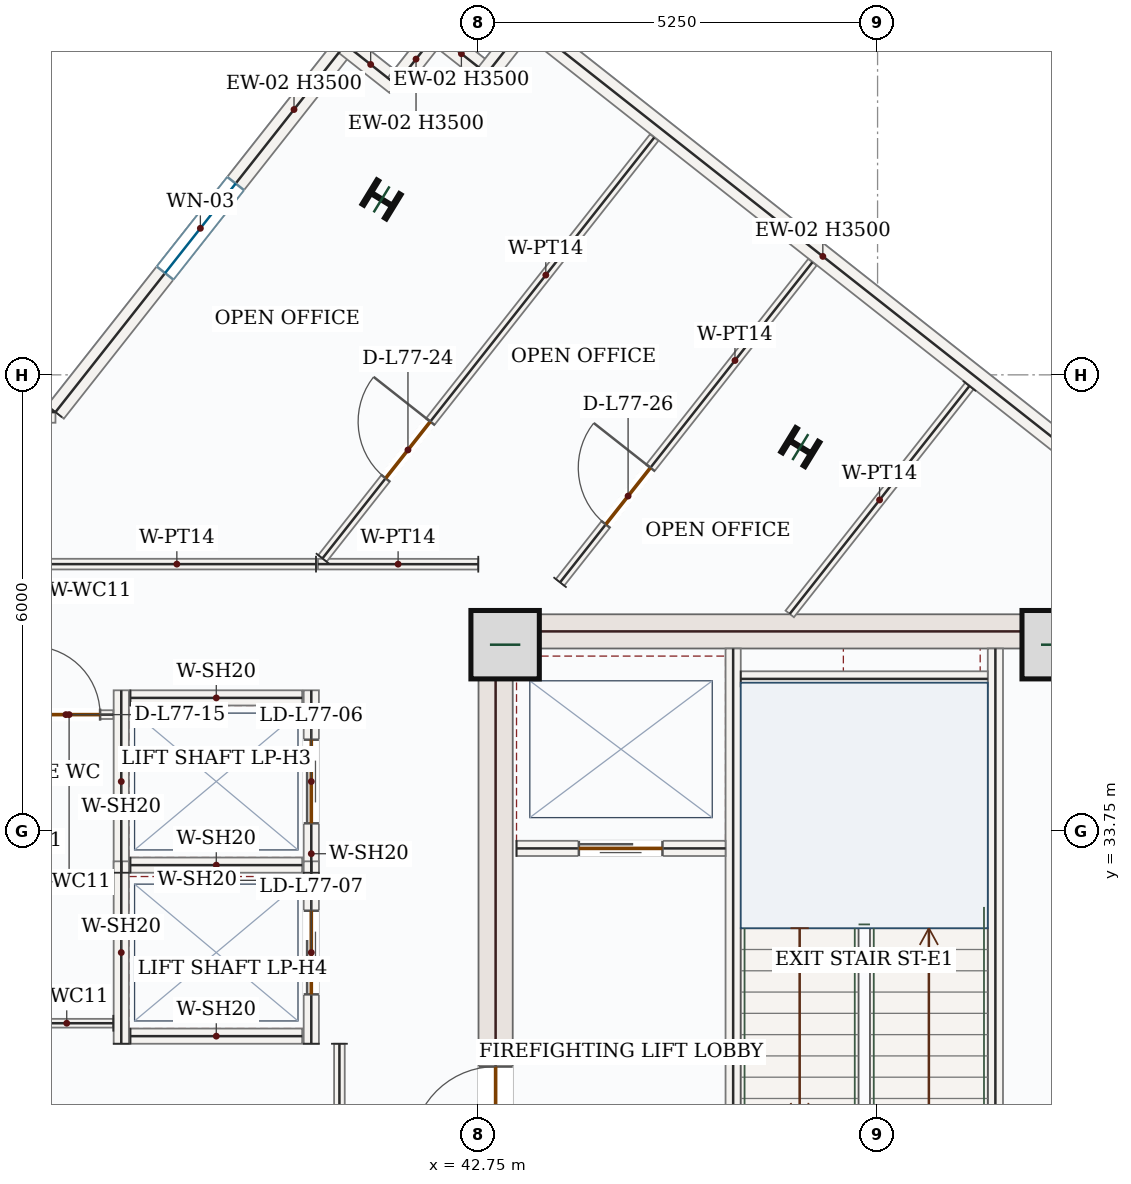
"""IFC4 building model, lengths in metres.
Left out: names, types, materials, properties, quantities, classifications, styles, units other than length and angle.
Written with IfcOpenShell. Run it as: python <this file> out.ifc"""

import sys

from ifc_helpers import new_model, si_unit, direction, frame, frame_2d, origin, origin_2d, place, context, subcontext, project, spatial, rectangle, i_section, extrude, source, transform, mapped, element, fill, save


model = new_model("IFC4")
c1 = context("Model", 3, precision=1e-05, world=origin(), true_north=direction((0.0, 1.0)))
c2 = subcontext(c1, "Body", "Model", "MODEL_VIEW")
j1 = project(units=[si_unit("LENGTHUNIT", "METRE"), si_unit("PLANEANGLEUNIT", "RADIAN")], contexts=[c1])
p1 = place(None, origin())
s1 = spatial("IfcSite", under=j1, at=p1, CompositionType="ELEMENT")
p2 = place(p1, origin())
s2 = spatial("IfcBuilding", under=s1, at=p2, CompositionType="ELEMENT")
p3 = place(p2, frame((0.0, 0.0, 319.8)))
s3 = spatial("IfcBuildingStorey", under=s2, at=p3, CompositionType="ELEMENT", Elevation=319.8)
p4 = place(p3, frame((42.975, 28.05, 0.0), z_axis=(0.0, 0.0, 1.0), x_axis=(0.0, 1.0, 0.0)))
e1 = element("IfcWall", 1, at=p4, inside=s3, PredefinedType="SHEAR", context=c2, shape_type="SweptSolid", body=[
    extrude(rectangle(XDim=8.55, YDim=0.45, at=frame_2d((4.275, 0.0))), origin(), (0.0, 0.0, 1.0), 3.5),
])
p5 = place(p4, frame((1.5, 0.0, 0.0)))
e2 = element("IfcOpeningElement", 2, at=p5, cuts=e1, PredefinedType="OPENING", context=c2, shape_type="SweptSolid", body=[
    extrude(rectangle(XDim=1.1, YDim=2.2, at=frame_2d((0.55, 1.1))), frame((0.0, 0.235, 0.0), z_axis=(0.0, -1.0, 0.0), x_axis=(1.0, 0.0, 0.0)), (0.0, 0.0, 1.0), 0.47),
])
m1 = source(origin(), c2, "Body", "SweptSolid", [
    extrude(rectangle(XDim=7.1, YDim=0.45, at=frame_2d((3.55, 0.0))), origin(), (0.0, 0.0, 1.0), 3.5),
])
p6 = place(p3, frame((43.2, 36.375, 0.0), z_axis=(0.0, 0.0, 1.0), x_axis=(1.0, 0.0, 0.0)))
e3 = element("IfcWall", 3, at=p6, inside=s3, PredefinedType="SHEAR", context=c2, shape_type="MappedRepresentation", body=[
    mapped(m1, transform((0.0, 0.0, 0.0), x_axis=(1.0, 0.0, 0.0), y_axis=(0.0, 1.0, 0.0), z_axis=(0.0, 0.0, 1.0), scale=1.0)),
])
m2 = source(origin(), c2, "Body", "SweptSolid", [
    extrude(rectangle(XDim=0.9, YDim=0.9, at=origin_2d()), origin(), (0.0, 0.0, 1.0), 3.75),
])
for number, where, z_axis, x_axis in (
    (4, (43.1, 36.2, 0.0), (0.0, 0.0, 1.0), (1.0, 0.0, 0.0)),
    (5, (50.35, 36.2, 0.0), (0.0, 0.0, 1.0), (1.0, 0.0, 0.0)),
):
    element("IfcColumn", number, at=place(p3, frame(where, z_axis=z_axis, x_axis=x_axis)), inside=s3, PredefinedType="COLUMN", context=c2, shape_type="MappedRepresentation", body=[
        mapped(m2, transform((0.0, 0.0, 0.0), x_axis=(1.0, 0.0, 0.0), y_axis=(0.0, 1.0, 0.0), z_axis=(0.0, 0.0, 1.0), scale=1.0)),
    ])
m3 = source(origin(), c2, "Body", "SweptSolid", [
    extrude(i_section(OverallWidth=0.374, OverallDepth=0.372, WebThickness=0.016, FlangeThickness=0.026, FilletRadius=0.018, at=origin_2d()), origin(), (0.0, 0.0, 1.0), 3.75),
])
for number, where, z_axis, x_axis in (
    (6, (46.984, 38.8, 0.0), (0.0, 0.0, 1.0), (0.522, 0.853, 0.0)),
    (7, (41.475, 42.058, 0.0), (0.0, 0.0, 1.0), (0.522, 0.853, 0.0)),
):
    element("IfcColumn", number, at=place(p3, frame(where, z_axis=z_axis, x_axis=x_axis)), inside=s3, PredefinedType="COLUMN", context=c2, shape_type="MappedRepresentation", body=[
        mapped(m3, transform((0.0, 0.0, 0.0), x_axis=(1.0, 0.0, 0.0), y_axis=(0.0, 1.0, 0.0), z_axis=(0.0, 0.0, 1.0), scale=1.0)),
    ])
m4 = source(origin(), c2, "Body", "SweptSolid", [
    extrude(rectangle(XDim=5.978, YDim=0.28, at=frame_2d((2.989, 0.0))), origin(), (0.0, 0.0, 1.0), 3.5),
])
p7 = place(p3, frame((31.206, 39.26, 0.0), z_axis=(0.0, 0.0, 1.0), x_axis=(1.0, 0.0, 0.0)))
e8 = element("IfcWall", 8, at=p7, inside=s3, PredefinedType="SOLIDWALL", context=c2, shape_type="MappedRepresentation", body=[
    mapped(m4, transform((0.0, 0.0, 0.0), x_axis=(1.0, 0.0, 0.0), y_axis=(0.0, 1.0, 0.0), z_axis=(0.0, 0.0, 1.0), scale=1.0)),
])
p8 = place(p3, frame((37.184, 39.26, 0.0), z_axis=(0.0, 0.0, 1.0), x_axis=(0.619100474058, 0.78531178714, 0.0)))
e9 = element("IfcWall", 9, at=p8, inside=s3, PredefinedType="SOLIDWALL", context=c2, shape_type="SweptSolid", body=[
    extrude(rectangle(XDim=6.159, YDim=0.28, at=frame_2d((3.08, 0.0))), origin(), (0.0, 0.0, 1.0), 3.5),
])
p9 = place(p8, frame((2.329, 0.0, 0.85)))
e10 = element("IfcOpeningElement", 10, at=p9, cuts=e9, PredefinedType="OPENING", context=c2, shape_type="SweptSolid", body=[
    extrude(rectangle(XDim=1.5, YDim=1.5, at=frame_2d((0.75, 0.75))), frame((0.0, 0.15, 0.0), z_axis=(0.0, -1.0, 0.0), x_axis=(1.0, 0.0, 0.0)), (0.0, 0.0, 1.0), 0.3),
])
m5 = source(origin(), c2, "Body", "SweptSolid", [
    extrude(rectangle(XDim=0.85, YDim=0.28, at=frame_2d((0.425, 0.0))), origin(), (0.0, 0.0, 1.0), 3.5),
])
p10 = place(p3, frame((40.997, 44.097, 0.0), z_axis=(0.0, 0.0, 1.0), x_axis=(0.785220826193, -0.619215838066, 0.0)))
e11 = element("IfcWall", 11, at=p10, inside=s3, PredefinedType="SOLIDWALL", context=c2, shape_type="MappedRepresentation", body=[
    mapped(m5, transform((0.0, 0.0, 0.0), x_axis=(1.0, 0.0, 0.0), y_axis=(0.0, 1.0, 0.0), z_axis=(0.0, 0.0, 1.0), scale=1.0)),
])
m6 = source(origin(), c2, "Body", "SweptSolid", [
    extrude(rectangle(XDim=0.85, YDim=0.28, at=frame_2d((0.425, 0.0))), origin(), (0.0, 0.0, 1.0), 3.5),
])
for number, where, z_axis, x_axis in (
    (12, (41.665, 43.57, 0.0), (0.0, 0.0, 1.0), (0.619, 0.785, 0.0)),
    (13, (42.191, 44.238, 0.0), (0.0, 0.0, 1.0), (0.785, -0.619, 0.0)),
):
    element("IfcWall", number, at=place(p3, frame(where, z_axis=z_axis, x_axis=x_axis)), inside=s3, PredefinedType="SOLIDWALL", context=c2, shape_type="MappedRepresentation", body=[
        mapped(m6, transform((0.0, 0.0, 0.0), x_axis=(1.0, 0.0, 0.0), y_axis=(0.0, 1.0, 0.0), z_axis=(0.0, 0.0, 1.0), scale=1.0)),
    ])
p11 = place(p3, frame((42.858, 43.712, 0.0), z_axis=(0.0, 0.0, 1.0), x_axis=(0.619215838066, 0.785220826193, 0.0)))
e14 = element("IfcWall", 14, at=p11, inside=s3, PredefinedType="SOLIDWALL", context=c2, shape_type="MappedRepresentation", body=[
    mapped(m5, transform((0.0, 0.0, 0.0), x_axis=(1.0, 0.0, 0.0), y_axis=(0.0, 1.0, 0.0), z_axis=(0.0, 0.0, 1.0), scale=1.0)),
])
m7 = source(origin(), c2, "Body", "SweptSolid", [
    extrude(rectangle(XDim=9.92, YDim=0.28, at=frame_2d((4.96, 0.0))), origin(), (0.0, 0.0, 1.0), 3.5),
])
p12 = place(p3, frame((43.385, 44.379, 0.0), z_axis=(0.0, 0.0, 1.0), x_axis=(0.785317257435, -0.619093535077, 0.0)))
e15 = element("IfcWall", 15, at=p12, inside=s3, PredefinedType="SOLIDWALL", context=c2, shape_type="MappedRepresentation", body=[
    mapped(m7, transform((0.0, 0.0, 0.0), x_axis=(1.0, 0.0, 0.0), y_axis=(0.0, 1.0, 0.0), z_axis=(0.0, 0.0, 1.0), scale=1.0)),
])
m8 = source(origin(), c2, "Body", "SweptSolid", [
    extrude(rectangle(XDim=7.87, YDim=0.2, at=frame_2d((3.935, 0.0))), origin(), (0.0, 0.0, 1.0), 3.5),
])
p13 = place(p3, frame((49.55, 28.28, 0.0), z_axis=(0.0, 0.0, 1.0), x_axis=(0.0, 1.0, 0.0)))
e16 = element("IfcWall", 16, at=p13, inside=s3, PredefinedType="SOLIDWALL", context=c2, shape_type="MappedRepresentation", body=[
    mapped(m8, transform((0.0, 0.0, 0.0), x_axis=(1.0, 0.0, 0.0), y_axis=(0.0, 1.0, 0.0), z_axis=(0.0, 0.0, 1.0), scale=1.0)),
])
p14 = place(p3, frame((46.1, 28.15, 0.0), z_axis=(0.0, 0.0, 1.0), x_axis=(0.0, 1.0, 0.0)))
e17 = element("IfcWall", 17, at=p14, inside=s3, PredefinedType="SOLIDWALL", context=c2, shape_type="SweptSolid", body=[
    extrude(rectangle(XDim=8.0, YDim=0.2, at=frame_2d((4.0, 0.0))), origin(), (0.0, 0.0, 1.0), 3.5),
])
p15 = place(p14, frame((0.4, 0.0, 0.0)))
e18 = element("IfcOpeningElement", 18, at=p15, cuts=e17, PredefinedType="OPENING", context=c2, shape_type="SweptSolid", body=[
    extrude(rectangle(XDim=1.05, YDim=2.15, at=frame_2d((0.525, 1.075))), frame((0.0, 0.11, 0.0), z_axis=(0.0, -1.0, 0.0), x_axis=(1.0, 0.0, 0.0)), (0.0, 0.0, 1.0), 0.22),
])
m9 = source(origin(), c2, "Body", "SweptSolid", [
    extrude(rectangle(XDim=3.25, YDim=0.2, at=frame_2d((1.625, 0.0))), origin(), (0.0, 0.0, 1.0), 3.5),
])
p16 = place(p3, frame((46.2, 35.75, 0.0), z_axis=(0.0, 0.0, 1.0), x_axis=(1.0, 0.0, 0.0)))
e19 = element("IfcWall", 19, at=p16, inside=s3, PredefinedType="SOLIDWALL", context=c2, shape_type="MappedRepresentation", body=[
    mapped(m9, transform((0.0, 0.0, 0.0), x_axis=(1.0, 0.0, 0.0), y_axis=(0.0, 1.0, 0.0), z_axis=(0.0, 0.0, 1.0), scale=1.0)),
])
p17 = place(p3, frame((43.25, 33.52, 0.0), z_axis=(0.0, 0.0, 1.0), x_axis=(1.0, 0.0, 0.0)))
e20 = element("IfcWall", 20, at=p17, inside=s3, PredefinedType="SOLIDWALL", context=c2, shape_type="SweptSolid", body=[
    extrude(rectangle(XDim=2.75, YDim=0.2, at=frame_2d((1.375, 0.0))), origin(), (0.0, 0.0, 1.0), 3.5),
])
p18 = place(p17, frame((0.82, 0.0, 0.0)))
e21 = element("IfcOpeningElement", 21, at=p18, cuts=e20, PredefinedType="OPENING", context=c2, shape_type="SweptSolid", body=[
    extrude(rectangle(XDim=1.1, YDim=2.15, at=frame_2d((0.55, 1.075))), frame((0.0, 0.11, 0.0), z_axis=(0.0, -1.0, 0.0), x_axis=(1.0, 0.0, 0.0)), (0.0, 0.0, 1.0), 0.22),
])
m10 = source(origin(), c2, "Body", "SweptSolid", [
    extrude(rectangle(XDim=2.4, YDim=0.2, at=frame_2d((1.2, 0.0))), origin(), (0.0, 0.0, 1.0), 3.5),
])
p19 = place(p3, frame((38.05, 33.2, 0.0), z_axis=(0.0, 0.0, 1.0), x_axis=(0.0, 1.0, 0.0)))
e22 = element("IfcWall", 22, at=p19, inside=s3, PredefinedType="SOLIDWALL", context=c2, shape_type="MappedRepresentation", body=[
    mapped(m10, transform((0.0, 0.0, 0.0), x_axis=(1.0, 0.0, 0.0), y_axis=(0.0, 1.0, 0.0), z_axis=(0.0, 0.0, 1.0), scale=1.0)),
])
p20 = place(p3, frame((40.55, 33.2, 0.0), z_axis=(0.0, 0.0, 1.0), x_axis=(0.0, 1.0, 0.0)))
e23 = element("IfcWall", 23, at=p20, inside=s3, PredefinedType="SOLIDWALL", context=c2, shape_type="SweptSolid", body=[
    extrude(rectangle(XDim=2.4, YDim=0.2, at=frame_2d((1.2, 0.0))), origin(), (0.0, 0.0, 1.0), 3.5),
])
p21 = place(p20, frame((0.65, 0.0, 0.0)))
e24 = element("IfcOpeningElement", 24, at=p21, cuts=e23, PredefinedType="OPENING", context=c2, shape_type="SweptSolid", body=[
    extrude(rectangle(XDim=1.1, YDim=2.15, at=frame_2d((0.55, 1.075))), frame((0.0, 0.11, 0.0), z_axis=(0.0, -1.0, 0.0), x_axis=(1.0, 0.0, 0.0)), (0.0, 0.0, 1.0), 0.22),
])
m11 = source(origin(), c2, "Body", "SweptSolid", [
    extrude(rectangle(XDim=2.26, YDim=0.2, at=frame_2d((1.13, 0.0))), origin(), (0.0, 0.0, 1.0), 3.5),
])
for number, where, z_axis, x_axis in (
    (25, (38.17, 33.3, 0.0), (0.0, 0.0, 1.0), (1.0, 0.0, 0.0)),
    (26, (38.17, 35.5, 0.0), (0.0, 0.0, 1.0), (1.0, 0.0, 0.0)),
):
    element("IfcWall", number, at=place(p3, frame(where, z_axis=z_axis, x_axis=x_axis)), inside=s3, PredefinedType="SOLIDWALL", context=c2, shape_type="MappedRepresentation", body=[
        mapped(m11, transform((0.0, 0.0, 0.0), x_axis=(1.0, 0.0, 0.0), y_axis=(0.0, 1.0, 0.0), z_axis=(0.0, 0.0, 1.0), scale=1.0)),
    ])
p22 = place(p3, frame((38.05, 30.95, 0.0), z_axis=(0.0, 0.0, 1.0), x_axis=(0.0, 1.0, 0.0)))
e27 = element("IfcWall", 27, at=p22, inside=s3, PredefinedType="SOLIDWALL", context=c2, shape_type="MappedRepresentation", body=[
    mapped(m10, transform((0.0, 0.0, 0.0), x_axis=(1.0, 0.0, 0.0), y_axis=(0.0, 1.0, 0.0), z_axis=(0.0, 0.0, 1.0), scale=1.0)),
])
p23 = place(p3, frame((40.55, 30.95, 0.0), z_axis=(0.0, 0.0, 1.0), x_axis=(0.0, 1.0, 0.0)))
e28 = element("IfcWall", 28, at=p23, inside=s3, PredefinedType="SOLIDWALL", context=c2, shape_type="SweptSolid", body=[
    extrude(rectangle(XDim=2.4, YDim=0.2, at=frame_2d((1.2, 0.0))), origin(), (0.0, 0.0, 1.0), 3.5),
])
p24 = place(p23, frame((0.65, 0.0, 0.0)))
e29 = element("IfcOpeningElement", 29, at=p24, cuts=e28, PredefinedType="OPENING", context=c2, shape_type="SweptSolid", body=[
    extrude(rectangle(XDim=1.1, YDim=2.15, at=frame_2d((0.55, 1.075))), frame((0.0, 0.11, 0.0), z_axis=(0.0, -1.0, 0.0), x_axis=(1.0, 0.0, 0.0)), (0.0, 0.0, 1.0), 0.22),
])
p25 = place(p3, frame((38.17, 31.05, 0.0), z_axis=(0.0, 0.0, 1.0), x_axis=(1.0, 0.0, 0.0)))
e30 = element("IfcWall", 30, at=p25, inside=s3, PredefinedType="SOLIDWALL", context=c2, shape_type="MappedRepresentation", body=[
    mapped(m11, transform((0.0, 0.0, 0.0), x_axis=(1.0, 0.0, 0.0), y_axis=(0.0, 1.0, 0.0), z_axis=(0.0, 0.0, 1.0), scale=1.0)),
])
m12 = source(origin(), c2, "Body", "SweptSolid", [
    extrude(rectangle(XDim=1.225, YDim=0.115, at=frame_2d((0.613, 0.0))), origin(), (0.0, 0.0, 1.0), 3.5),
])
p26 = place(p3, frame((37.945, 31.22, 0.0), z_axis=(0.0, 0.0, 1.0), x_axis=(-1.0, 0.0, 0.0)))
e31 = element("IfcWall", 31, at=p26, inside=s3, PredefinedType="PARTITIONING", context=c2, shape_type="MappedRepresentation", body=[
    mapped(m12, transform((0.0, 0.0, 0.0), x_axis=(1.0, 0.0, 0.0), y_axis=(0.0, 1.0, 0.0), z_axis=(0.0, 0.0, 1.0), scale=1.0)),
])
p27 = place(p3, frame((36.782, 35.28, 0.0), z_axis=(0.0, 0.0, 1.0), x_axis=(1.0, 0.0, 0.0)))
e32 = element("IfcWall", 32, at=p27, inside=s3, PredefinedType="PARTITIONING", context=c2, shape_type="SweptSolid", body=[
    extrude(rectangle(XDim=1.163, YDim=0.115, at=frame_2d((0.581, 0.0))), origin(), (0.0, 0.0, 1.0), 3.5),
])
p28 = place(p27, frame((0.089, 0.0, 0.0)))
e33 = element("IfcOpeningElement", 33, at=p28, cuts=e32, PredefinedType="OPENING", context=c2, shape_type="SweptSolid", body=[
    extrude(rectangle(XDim=0.9, YDim=2.1, at=frame_2d((0.45, 1.05))), frame((0.0, 0.067, 0.0), z_axis=(0.0, -1.0, 0.0), x_axis=(1.0, 0.0, 0.0)), (0.0, 0.0, 1.0), 0.135),
])
m13 = source(origin(), c2, "Body", "SweptSolid", [
    extrude(rectangle(XDim=3.818, YDim=0.14, at=frame_2d((1.909, 0.0))), origin(), (0.0, 0.0, 1.0), 3.5),
])
p29 = place(p3, frame((49.208, 39.604, 0.0), z_axis=(0.0, 0.0, 1.0), x_axis=(-0.619119655452, -0.78529666511, 0.0)))
e34 = element("IfcWall", 34, at=p29, inside=s3, PredefinedType="PARTITIONING", context=c2, shape_type="MappedRepresentation", body=[
    mapped(m13, transform((0.0, 0.0, 0.0), x_axis=(1.0, 0.0, 0.0), y_axis=(0.0, 1.0, 0.0), z_axis=(0.0, 0.0, 1.0), scale=1.0)),
])
p30 = place(p3, frame((43.823, 37.02, 0.0), z_axis=(0.0, 0.0, 1.0), x_axis=(0.619105408422, 0.785307897109, 0.0)))
e35 = element("IfcWall", 35, at=p30, inside=s3, PredefinedType="PARTITIONING", context=c2, shape_type="SweptSolid", body=[
    extrude(rectangle(XDim=5.363, YDim=0.14, at=frame_2d((2.682, 0.0))), origin(), (0.0, 0.0, 1.0), 3.5),
])
p31 = place(p30, frame((0.971, 0.0, 0.0)))
e36 = element("IfcOpeningElement", 36, at=p31, cuts=e35, PredefinedType="OPENING", context=c2, shape_type="SweptSolid", body=[
    extrude(rectangle(XDim=0.95, YDim=2.15, at=frame_2d((0.475, 1.075))), frame((0.0, 0.08, 0.0), z_axis=(0.0, -1.0, 0.0), x_axis=(1.0, 0.0, 0.0)), (0.0, 0.0, 1.0), 0.16),
])
m14 = source(origin(), c2, "Body", "SweptSolid", [
    extrude(rectangle(XDim=2.109, YDim=0.14, at=frame_2d((1.054, 0.0))), origin(), (0.0, 0.0, 1.0), 3.5),
])
p32 = place(p3, frame((42.747, 37.259, 0.0), z_axis=(0.0, 0.0, 1.0), x_axis=(-0.999999832474, 0.000578837597, 0.0)))
e37 = element("IfcWall", 37, at=p32, inside=s3, PredefinedType="PARTITIONING", context=c2, shape_type="MappedRepresentation", body=[
    mapped(m14, transform((0.0, 0.0, 0.0), x_axis=(1.0, 0.0, 0.0), y_axis=(0.0, 1.0, 0.0), z_axis=(0.0, 0.0, 1.0), scale=1.0)),
])
p33 = place(p3, frame((40.697, 37.335, 0.0), z_axis=(0.0, 0.0, 1.0), x_axis=(0.619105259882, 0.785308014213, 0.0)))
e38 = element("IfcWall", 38, at=p33, inside=s3, PredefinedType="PARTITIONING", context=c2, shape_type="SweptSolid", body=[
    extrude(rectangle(XDim=7.051, YDim=0.14, at=frame_2d((3.525, 0.0))), origin(), (0.0, 0.0, 1.0), 3.5),
])
p34 = place(p33, frame((1.342, 0.0, 0.0)))
e39 = element("IfcOpeningElement", 39, at=p34, cuts=e38, PredefinedType="OPENING", context=c2, shape_type="SweptSolid", body=[
    extrude(rectangle(XDim=0.95, YDim=2.15, at=frame_2d((0.475, 1.075))), frame((0.0, 0.08, 0.0), z_axis=(0.0, -1.0, 0.0), x_axis=(1.0, 0.0, 0.0)), (0.0, 0.0, 1.0), 0.16),
])
m15 = source(origin(), c2, "Body", "SweptSolid", [
    extrude(rectangle(XDim=3.01, YDim=0.14, at=frame_2d((1.505, 0.0))), origin(), (0.0, 0.0, 1.0), 3.5),
])
p35 = place(p3, frame((40.92, 30.95, 0.0), z_axis=(0.0, 0.0, 1.0), x_axis=(0.0, -1.0, 0.0)))
e40 = element("IfcWall", 40, at=p35, inside=s3, PredefinedType="PARTITIONING", context=c2, shape_type="MappedRepresentation", body=[
    mapped(m15, transform((0.0, 0.0, 0.0), x_axis=(1.0, 0.0, 0.0), y_axis=(0.0, 1.0, 0.0), z_axis=(0.0, 0.0, 1.0), scale=1.0)),
])
p36 = place(p3, frame((40.612, 37.26, 0.0), z_axis=(0.0, 0.0, 1.0), x_axis=(-1.0, 0.0, 0.0)))
e41 = element("IfcWall", 41, at=p36, inside=s3, PredefinedType="PARTITIONING", context=c2, shape_type="SweptSolid", body=[
    extrude(rectangle(XDim=5.837, YDim=0.14, at=frame_2d((2.918, 0.0))), origin(), (0.0, 0.0, 1.0), 3.5),
])
p37 = place(p36, frame((3.812, 0.0, 0.0)))
e42 = element("IfcOpeningElement", 42, at=p37, cuts=e41, PredefinedType="OPENING", context=c2, shape_type="SweptSolid", body=[
    extrude(rectangle(XDim=0.95, YDim=2.15, at=frame_2d((0.475, 1.075))), frame((0.0, 0.08, 0.0), z_axis=(0.0, -1.0, 0.0), x_axis=(1.0, 0.0, 0.0)), (0.0, 0.0, 1.0), 0.16),
])
m16 = source(origin(), c2, "Body", "SweptSolid", [
    extrude(rectangle(XDim=1.5, YDim=1.5, at=frame_2d((0.75, 0.75))), frame((0.0, 0.03, 0.0), z_axis=(0.0, -1.0, 0.0), x_axis=(1.0, 0.0, 0.0)), (0.0, 0.0, 1.0), 0.06),
])
p38 = place(p9, origin())
e43 = element("IfcWindow", 43, at=p38, inside=s3, PartitioningType="SINGLE_PANEL", PredefinedType="WINDOW", context=c2, shape_type="MappedRepresentation", body=[
    mapped(m16, transform((0.0, 0.0, 0.0), x_axis=(1.0, 0.0, 0.0), y_axis=(0.0, 1.0, 0.0), z_axis=(0.0, 0.0, 1.0), scale=1.0)),
])
fill(e10, e43)
m17 = source(origin(), c2, "Body", "SweptSolid", [
    extrude(rectangle(XDim=1.1, YDim=2.15, at=frame_2d((0.55, 1.075))), frame((0.0, 0.025, 0.0), z_axis=(0.0, -1.0, 0.0), x_axis=(1.0, 0.0, 0.0)), (0.0, 0.0, 1.0), 0.05),
])
p39 = place(p18, origin())
e44 = element("IfcDoor", 44, at=p39, inside=s3, OperationType="DOUBLE_DOOR_SLIDING", PredefinedType="DOOR", context=c2, shape_type="MappedRepresentation", body=[
    mapped(m17, transform((0.0, 0.0, 0.0), x_axis=(1.0, 0.0, 0.0), y_axis=(0.0, 1.0, 0.0), z_axis=(0.0, 0.0, 1.0), scale=1.0)),
])
fill(e21, e44)
m18 = source(origin(), c2, "Body", "SweptSolid", [
    extrude(rectangle(XDim=1.1, YDim=2.2, at=frame_2d((0.55, 1.1))), frame((0.0, 0.025, 0.0), z_axis=(0.0, -1.0, 0.0), x_axis=(1.0, 0.0, 0.0)), (0.0, 0.0, 1.0), 0.05),
])
p40 = place(p5, origin())
e45 = element("IfcDoor", 45, at=p40, inside=s3, OperationType="SINGLE_SWING_LEFT", PredefinedType="DOOR", context=c2, shape_type="MappedRepresentation", body=[
    mapped(m18, transform((0.0, 0.0, 0.0), x_axis=(1.0, 0.0, 0.0), y_axis=(0.0, 1.0, 0.0), z_axis=(0.0, 0.0, 1.0), scale=1.0)),
])
fill(e2, e45)
p41 = place(p21, origin())
e46 = element("IfcDoor", 46, at=p41, inside=s3, OperationType="DOUBLE_DOOR_SLIDING", PredefinedType="DOOR", context=c2, shape_type="MappedRepresentation", body=[
    mapped(m17, transform((0.0, 0.0, 0.0), x_axis=(1.0, 0.0, 0.0), y_axis=(0.0, 1.0, 0.0), z_axis=(0.0, 0.0, 1.0), scale=1.0)),
])
fill(e24, e46)
p42 = place(p24, origin())
e47 = element("IfcDoor", 47, at=p42, inside=s3, OperationType="DOUBLE_DOOR_SLIDING", PredefinedType="DOOR", context=c2, shape_type="MappedRepresentation", body=[
    mapped(m17, transform((0.0, 0.0, 0.0), x_axis=(1.0, 0.0, 0.0), y_axis=(0.0, 1.0, 0.0), z_axis=(0.0, 0.0, 1.0), scale=1.0)),
])
fill(e29, e47)
m19 = source(origin(), c2, "Body", "SweptSolid", [
    extrude(rectangle(XDim=0.9, YDim=2.1, at=frame_2d((0.45, 1.05))), frame((0.0, 0.025, 0.0), z_axis=(0.0, -1.0, 0.0), x_axis=(1.0, 0.0, 0.0)), (0.0, 0.0, 1.0), 0.05),
])
p43 = place(p28, origin())
e48 = element("IfcDoor", 48, at=p43, inside=s3, OperationType="SINGLE_SWING_LEFT", PredefinedType="DOOR", context=c2, shape_type="MappedRepresentation", body=[
    mapped(m19, transform((0.0, 0.0, 0.0), x_axis=(1.0, 0.0, 0.0), y_axis=(0.0, 1.0, 0.0), z_axis=(0.0, 0.0, 1.0), scale=1.0)),
])
fill(e33, e48)
m20 = source(origin(), c2, "Body", "SweptSolid", [
    extrude(rectangle(XDim=0.95, YDim=2.15, at=frame_2d((0.475, 1.075))), frame((0.0, 0.025, 0.0), z_axis=(0.0, -1.0, 0.0), x_axis=(1.0, 0.0, 0.0)), (0.0, 0.0, 1.0), 0.05),
])
p44 = place(p34, origin())
e49 = element("IfcDoor", 49, at=p44, inside=s3, OperationType="SINGLE_SWING_RIGHT", PredefinedType="DOOR", context=c2, shape_type="MappedRepresentation", body=[
    mapped(m20, transform((0.0, 0.0, 0.0), x_axis=(1.0, 0.0, 0.0), y_axis=(0.0, 1.0, 0.0), z_axis=(0.0, 0.0, 1.0), scale=1.0)),
])
fill(e39, e49)
p45 = place(p31, origin())
e50 = element("IfcDoor", 50, at=p45, inside=s3, OperationType="SINGLE_SWING_RIGHT", PredefinedType="DOOR", context=c2, shape_type="MappedRepresentation", body=[
    mapped(m20, transform((0.0, 0.0, 0.0), x_axis=(1.0, 0.0, 0.0), y_axis=(0.0, 1.0, 0.0), z_axis=(0.0, 0.0, 1.0), scale=1.0)),
])
fill(e36, e50)
save(model, sys.argv[1])
